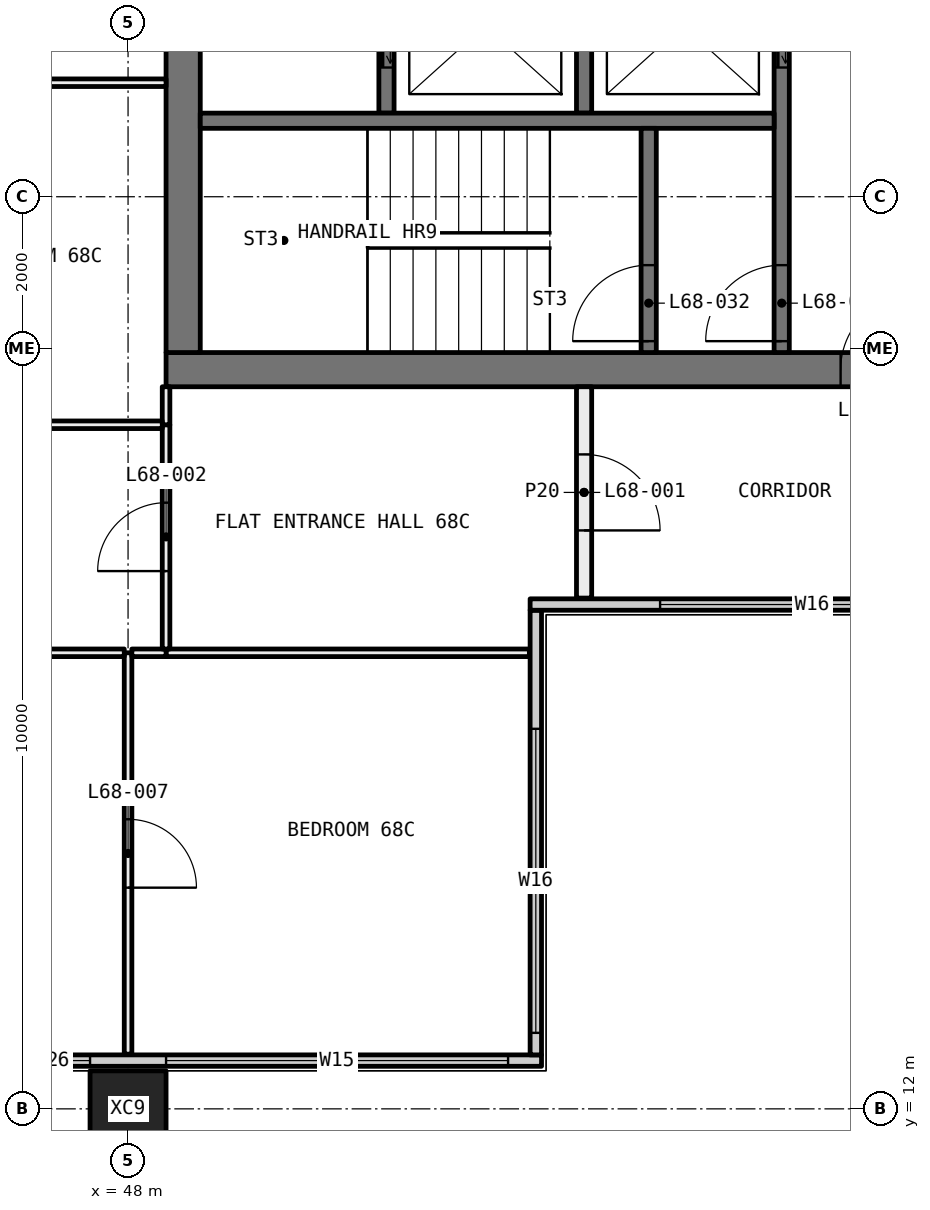
"""IFC4 building model, lengths in metres.
Left out: names, types, materials, properties, quantities, classifications, styles, units other than length and angle.
Written with IfcOpenShell. Run it as: python <this file> out.ifc"""

import sys

from ifc_helpers import new_model, si_unit, direction, frame, frame_2d, origin, origin_2d, place, context, subcontext, project, spatial, rectangle, hollow_rectangle, extrude, element, fill, save


model = new_model("IFC4")
c1 = context("Model", 3, precision=1e-05, world=origin(), true_north=direction((0.0, 1.0)))
c2 = subcontext(c1, "Body", "Model", "MODEL_VIEW")
j1 = project(units=[si_unit("LENGTHUNIT", "METRE"), si_unit("PLANEANGLEUNIT", "RADIAN")], contexts=[c1])
p1 = place(None, origin())
s1 = spatial("IfcSite", under=j1, at=p1, CompositionType="ELEMENT")
p2 = place(p1, origin())
s2 = spatial("IfcBuilding", under=s1, at=p2, CompositionType="ELEMENT")
p3 = place(p2, frame((0.0, 0.0, 252.45)))
s3 = spatial("IfcBuildingStorey", under=s2, at=p3, CompositionType="ELEMENT", Elevation=252.45)
p4 = place(p3, frame((48.0, 12.0, -0.4), z_axis=(0.0, 0.0, 1.0), x_axis=(1.0, 0.0, 0.0)))
e1 = element("IfcColumn", 1, at=p4, inside=s3, PredefinedType="COLUMN", context=c2, shape_type="SweptSolid", body=[
    extrude(hollow_rectangle(XDim=1.0, YDim=1.0, WallThickness=0.036, at=origin_2d()), origin(), (0.0, 0.0, 1.0), 3.45),
])
p5 = place(p3, frame((36.0, 12.635, 0.0), z_axis=(0.0, 0.0, 1.0), x_axis=(1.0, 0.0, 0.0)))
e2 = element("IfcWall", 2, at=p5, inside=s3, PredefinedType="ELEMENTEDWALL", context=c2, shape_type="SweptSolid", body=[
    extrude(rectangle(XDim=17.44, YDim=0.15, at=frame_2d((8.72, 0.0))), origin(), (0.0, 0.0, 1.0), 3.05),
])
p6 = place(p5, frame((0.5, 0.0, 0.45)))
e3 = element("IfcOpeningElement", 3, at=p6, cuts=e2, PredefinedType="OPENING", context=c2, shape_type="SweptSolid", body=[
    extrude(rectangle(XDim=1.0, YDim=2.55, at=frame_2d((0.5, 1.275))), frame((0.0, 0.085, 0.0), z_axis=(0.0, -1.0, 0.0), x_axis=(1.0, 0.0, 0.0)), (0.0, 0.0, 1.0), 0.17),
])
p7 = place(p5, frame((4.0, 0.0, 0.45)))
e4 = element("IfcOpeningElement", 4, at=p7, cuts=e2, PredefinedType="OPENING", context=c2, shape_type="SweptSolid", body=[
    extrude(rectangle(XDim=1.5, YDim=2.55, at=frame_2d((0.75, 1.275))), frame((0.0, 0.085, 0.0), z_axis=(0.0, -1.0, 0.0), x_axis=(1.0, 0.0, 0.0)), (0.0, 0.0, 1.0), 0.17),
])
p8 = place(p5, frame((6.5, 0.0, 0.45)))
e5 = element("IfcOpeningElement", 5, at=p8, cuts=e2, PredefinedType="OPENING", context=c2, shape_type="SweptSolid", body=[
    extrude(rectangle(XDim=1.5, YDim=2.55, at=frame_2d((0.75, 1.275))), frame((0.0, 0.085, 0.0), z_axis=(0.0, -1.0, 0.0), x_axis=(1.0, 0.0, 0.0)), (0.0, 0.0, 1.0), 0.17),
])
p9 = place(p5, frame((10.5, 0.0, 0.45)))
e6 = element("IfcOpeningElement", 6, at=p9, cuts=e2, PredefinedType="OPENING", context=c2, shape_type="SweptSolid", body=[
    extrude(rectangle(XDim=1.0, YDim=2.55, at=frame_2d((0.5, 1.275))), frame((0.0, 0.085, 0.0), z_axis=(0.0, -1.0, 0.0), x_axis=(1.0, 0.0, 0.0)), (0.0, 0.0, 1.0), 0.17),
])
p10 = place(p5, frame((12.5, 0.0, 0.45)))
e7 = element("IfcOpeningElement", 7, at=p10, cuts=e2, PredefinedType="OPENING", context=c2, shape_type="SweptSolid", body=[
    extrude(rectangle(XDim=4.5, YDim=2.55, at=frame_2d((2.25, 1.275))), frame((0.0, 0.085, 0.0), z_axis=(0.0, -1.0, 0.0), x_axis=(1.0, 0.0, 0.0)), (0.0, 0.0, 1.0), 0.17),
])
p11 = place(p3, frame((53.365, 12.71, 0.0), z_axis=(0.0, 0.0, 1.0), x_axis=(0.0, 1.0, 0.0)))
e8 = element("IfcWall", 8, at=p11, inside=s3, PredefinedType="ELEMENTEDWALL", context=c2, shape_type="SweptSolid", body=[
    extrude(rectangle(XDim=5.85, YDim=0.15, at=frame_2d((2.925, 0.0))), origin(), (0.0, 0.0, 1.0), 3.05),
])
p12 = place(p11, frame((0.29, 0.0, 0.45)))
e9 = element("IfcOpeningElement", 9, at=p12, cuts=e8, PredefinedType="OPENING", context=c2, shape_type="SweptSolid", body=[
    extrude(rectangle(XDim=4.0, YDim=2.55, at=frame_2d((2.0, 1.275))), frame((0.0, 0.085, 0.0), z_axis=(0.0, -1.0, 0.0), x_axis=(1.0, 0.0, 0.0)), (0.0, 0.0, 1.0), 0.17),
])
p13 = place(p3, frame((53.29, 18.635, 0.0), z_axis=(0.0, 0.0, 1.0), x_axis=(1.0, 0.0, 0.0)))
e10 = element("IfcWall", 10, at=p13, inside=s3, PredefinedType="ELEMENTEDWALL", context=c2, shape_type="SweptSolid", body=[
    extrude(rectangle(XDim=6.15, YDim=0.15, at=frame_2d((3.075, 0.0))), origin(), (0.0, 0.0, 1.0), 3.05),
])
p14 = place(p13, frame((1.71, 0.0, 0.45)))
e11 = element("IfcOpeningElement", 11, at=p14, cuts=e10, PredefinedType="OPENING", context=c2, shape_type="SweptSolid", body=[
    extrude(rectangle(XDim=4.0, YDim=2.55, at=frame_2d((2.0, 1.275))), frame((0.0, 0.085, 0.0), z_axis=(0.0, -1.0, 0.0), x_axis=(1.0, 0.0, 0.0)), (0.0, 0.0, 1.0), 0.17),
])
p15 = place(p3, frame((48.0, 12.72, 0.0), z_axis=(0.0, 0.0, 1.0), x_axis=(0.0, 1.0, 0.0)))
e12 = element("IfcWall", 12, at=p15, inside=s3, PredefinedType="PARTITIONING", context=c2, shape_type="SweptSolid", body=[
    extrude(rectangle(XDim=5.28, YDim=0.1, at=frame_2d((2.64, 0.0))), origin(), (0.0, 0.0, 1.0), 3.05),
])
p16 = place(p15, frame((2.19, 0.0, 0.0)))
e13 = element("IfcOpeningElement", 13, at=p16, cuts=e12, PredefinedType="OPENING", context=c2, shape_type="SweptSolid", body=[
    extrude(rectangle(XDim=0.9, YDim=2.1, at=frame_2d((0.45, 1.05))), frame((0.0, 0.06, 0.0), z_axis=(0.0, -1.0, 0.0), x_axis=(1.0, 0.0, 0.0)), (0.0, 0.0, 1.0), 0.12),
])
p17 = place(p3, frame((47.95, 18.0, 0.0), z_axis=(0.0, 0.0, 1.0), x_axis=(-1.0, 0.0, 0.0)))
e14 = element("IfcWall", 14, at=p17, inside=s3, PredefinedType="PARTITIONING", context=c2, shape_type="SweptSolid", body=[
    extrude(rectangle(XDim=5.875, YDim=0.1, at=frame_2d((2.938, 0.0))), origin(), (0.0, 0.0, 1.0), 3.05),
])
p18 = place(p17, frame((2.488, 0.0, 0.0)))
e15 = element("IfcOpeningElement", 15, at=p18, cuts=e14, PredefinedType="OPENING", context=c2, shape_type="SweptSolid", body=[
    extrude(rectangle(XDim=0.9, YDim=2.1, at=frame_2d((0.45, 1.05))), frame((0.0, 0.06, 0.0), z_axis=(0.0, -1.0, 0.0), x_axis=(1.0, 0.0, 0.0)), (0.0, 0.0, 1.0), 0.12),
])
p19 = place(p3, frame((53.28, 18.0, 0.0), z_axis=(0.0, 0.0, 1.0), x_axis=(-1.0, 0.0, 0.0)))
e16 = element("IfcWall", 16, at=p19, inside=s3, PredefinedType="PARTITIONING", context=c2, shape_type="SweptSolid", body=[
    extrude(rectangle(XDim=4.78, YDim=0.1, at=frame_2d((2.39, 0.0))), origin(), (0.0, 0.0, 1.0), 3.05),
])
p20 = place(p3, frame((48.5, 18.0, 0.0), z_axis=(0.0, 0.0, 1.0), x_axis=(-1.0, 0.0, 0.0)))
e17 = element("IfcWall", 17, at=p20, inside=s3, PredefinedType="PARTITIONING", context=c2, shape_type="SweptSolid", body=[
    extrude(rectangle(XDim=0.45, YDim=0.1, at=frame_2d((0.225, 0.0))), origin(), (0.0, 0.0, 1.0), 3.05),
])
p21 = place(p3, frame((48.5, 21.0, 0.0), z_axis=(0.0, 0.0, 1.0), x_axis=(0.0, -1.0, 0.0)))
e18 = element("IfcWall", 18, at=p21, inside=s3, PredefinedType="PARTITIONING", context=c2, shape_type="SweptSolid", body=[
    extrude(rectangle(XDim=2.95, YDim=0.1, at=frame_2d((1.475, 0.0))), origin(), (0.0, 0.0, 1.0), 3.05),
])
p22 = place(p21, frame((1.025, 0.0, 0.0)))
e19 = element("IfcOpeningElement", 19, at=p22, cuts=e18, PredefinedType="OPENING", context=c2, shape_type="SweptSolid", body=[
    extrude(rectangle(XDim=0.9, YDim=2.1, at=frame_2d((0.45, 1.05))), frame((0.0, 0.06, 0.0), z_axis=(0.0, -1.0, 0.0), x_axis=(1.0, 0.0, 0.0)), (0.0, 0.0, 1.0), 0.12),
])
p23 = place(p3, frame((48.5, 21.5, 0.0), z_axis=(0.0, 0.0, 1.0), x_axis=(0.0, -1.0, 0.0)))
e20 = element("IfcWall", 20, at=p23, inside=s3, PredefinedType="PARTITIONING", context=c2, shape_type="SweptSolid", body=[
    extrude(rectangle(XDim=0.5, YDim=0.1, at=frame_2d((0.25, 0.0))), origin(), (0.0, 0.0, 1.0), 3.05),
])
p24 = place(p3, frame((54.0, 18.72, 0.0), z_axis=(0.0, 0.0, 1.0), x_axis=(0.0, 1.0, 0.0)))
e21 = element("IfcWall", 21, at=p24, inside=s3, PredefinedType="PARTITIONING", context=c2, shape_type="SweptSolid", body=[
    extrude(rectangle(XDim=2.78, YDim=0.2, at=frame_2d((1.39, 0.0))), origin(), (0.0, 0.0, 1.0), 3.05),
])
p25 = place(p24, frame((0.89, 0.0, 0.0)))
e22 = element("IfcOpeningElement", 22, at=p25, cuts=e21, PredefinedType="OPENING", context=c2, shape_type="SweptSolid", body=[
    extrude(rectangle(XDim=1.0, YDim=2.1, at=frame_2d((0.5, 1.05))), frame((0.0, 0.11, 0.0), z_axis=(0.0, -1.0, 0.0), x_axis=(1.0, 0.0, 0.0)), (0.0, 0.0, 1.0), 0.22),
])
p26 = place(p3, frame((48.45, 21.0, 0.0), z_axis=(0.0, 0.0, 1.0), x_axis=(-1.0, 0.0, 0.0)))
e23 = element("IfcWall", 23, at=p26, inside=s3, PredefinedType="PARTITIONING", context=c2, shape_type="SweptSolid", body=[
    extrude(rectangle(XDim=6.4, YDim=0.1, at=frame_2d((3.2, 0.0))), origin(), (0.0, 0.0, 1.0), 3.05),
])
p27 = place(p26, frame((2.75, 0.0, 0.0)))
e24 = element("IfcOpeningElement", 24, at=p27, cuts=e23, PredefinedType="OPENING", context=c2, shape_type="SweptSolid", body=[
    extrude(rectangle(XDim=0.9, YDim=2.1, at=frame_2d((0.45, 1.05))), frame((0.0, 0.06, 0.0), z_axis=(0.0, -1.0, 0.0), x_axis=(1.0, 0.0, 0.0)), (0.0, 0.0, 1.0), 0.12),
])
p28 = place(p3, frame((48.5, 25.5, 0.0), z_axis=(0.0, 0.0, 1.0), x_axis=(-1.0, 0.0, 0.0)))
e25 = element("IfcWall", 25, at=p28, inside=s3, PredefinedType="PARTITIONING", context=c2, shape_type="SweptSolid", body=[
    extrude(rectangle(XDim=6.45, YDim=0.1, at=frame_2d((3.225, 0.0))), origin(), (0.0, 0.0, 1.0), 3.05),
])
p29 = place(p28, frame((2.775, 0.0, 0.0)))
e26 = element("IfcOpeningElement", 26, at=p29, cuts=e25, PredefinedType="OPENING", context=c2, shape_type="SweptSolid", body=[
    extrude(rectangle(XDim=0.9, YDim=2.1, at=frame_2d((0.45, 1.05))), frame((0.0, 0.06, 0.0), z_axis=(0.0, -1.0, 0.0), x_axis=(1.0, 0.0, 0.0)), (0.0, 0.0, 1.0), 0.12),
])
p30 = place(p3, frame((59.5, 21.725, 0.0), z_axis=(0.0, 0.0, 1.0), x_axis=(-1.0, 0.0, 0.0)))
e27 = element("IfcWall", 27, at=p30, inside=s3, PredefinedType="SHEAR", context=c2, shape_type="SweptSolid", body=[
    extrude(rectangle(XDim=11.0, YDim=0.45, at=frame_2d((5.5, 0.0))), origin(), (0.0, 0.0, 1.0), 3.05),
])
p31 = place(p30, frame((1.125, 0.0, 0.0)))
e28 = element("IfcOpeningElement", 28, at=p31, cuts=e27, PredefinedType="OPENING", context=c2, shape_type="SweptSolid", body=[
    extrude(rectangle(XDim=1.0, YDim=2.1, at=frame_2d((0.5, 1.05))), frame((0.0, 0.235, 0.0), z_axis=(0.0, -1.0, 0.0), x_axis=(1.0, 0.0, 0.0)), (0.0, 0.0, 1.0), 0.47),
])
p32 = place(p3, frame((48.725, 21.95, 0.0), z_axis=(0.0, 0.0, 1.0), x_axis=(0.0, 1.0, 0.0)))
e29 = element("IfcWall", 29, at=p32, inside=s3, PredefinedType="SHEAR", context=c2, shape_type="SweptSolid", body=[
    extrude(rectangle(XDim=16.1, YDim=0.45, at=frame_2d((8.05, 0.0))), origin(), (0.0, 0.0, 1.0), 3.05),
])
p33 = place(p32, frame((7.25, 0.0, 0.0)))
e30 = element("IfcOpeningElement", 30, at=p33, cuts=e29, PredefinedType="OPENING", context=c2, shape_type="SweptSolid", body=[
    extrude(rectangle(XDim=1.6, YDim=2.1, at=frame_2d((0.8, 1.05))), frame((0.0, 0.235, 0.0), z_axis=(0.0, -1.0, 0.0), x_axis=(1.0, 0.0, 0.0)), (0.0, 0.0, 1.0), 0.47),
])
p34 = place(p3, frame((56.6, 21.95, 0.0), z_axis=(0.0, 0.0, 1.0), x_axis=(0.0, 1.0, 0.0)))
e31 = element("IfcWall", 31, at=p34, inside=s3, PredefinedType="SOLIDWALL", context=c2, shape_type="SweptSolid", body=[
    extrude(rectangle(XDim=12.95, YDim=0.2, at=frame_2d((6.475, 0.0))), origin(), (0.0, 0.0, 1.0), 3.05),
])
p35 = place(p34, frame((3.75, 0.0, 0.0)))
e32 = element("IfcOpeningElement", 32, at=p35, cuts=e31, PredefinedType="OPENING", context=c2, shape_type="SweptSolid", body=[
    extrude(rectangle(XDim=1.1, YDim=2.1, at=frame_2d((0.55, 1.05))), frame((0.0, 0.11, 0.0), z_axis=(0.0, -1.0, 0.0), x_axis=(1.0, 0.0, 0.0)), (0.0, 0.0, 1.0), 0.22),
])
p36 = place(p34, frame((0.15, 0.0, 0.0)))
e33 = element("IfcOpeningElement", 33, at=p36, cuts=e31, PredefinedType="OPENING", context=c2, shape_type="SweptSolid", body=[
    extrude(rectangle(XDim=1.0, YDim=2.1, at=frame_2d((0.5, 1.05))), frame((0.0, 0.11, 0.0), z_axis=(0.0, -1.0, 0.0), x_axis=(1.0, 0.0, 0.0)), (0.0, 0.0, 1.0), 0.22),
])
p37 = place(p34, frame((7.025, 0.0, 0.0)))
e34 = element("IfcOpeningElement", 34, at=p37, cuts=e31, PredefinedType="OPENING", context=c2, shape_type="SweptSolid", body=[
    extrude(rectangle(XDim=0.9, YDim=2.1, at=frame_2d((0.45, 1.05))), frame((0.0, 0.11, 0.0), z_axis=(0.0, -1.0, 0.0), x_axis=(1.0, 0.0, 0.0)), (0.0, 0.0, 1.0), 0.22),
])
p38 = place(p34, frame((10.675, 0.0, 0.0)))
e35 = element("IfcOpeningElement", 35, at=p38, cuts=e31, PredefinedType="OPENING", context=c2, shape_type="SweptSolid", body=[
    extrude(rectangle(XDim=0.9, YDim=2.1, at=frame_2d((0.45, 1.05))), frame((0.0, 0.11, 0.0), z_axis=(0.0, -1.0, 0.0), x_axis=(1.0, 0.0, 0.0)), (0.0, 0.0, 1.0), 0.22),
])
p39 = place(p3, frame((51.4, 25.1, 0.0), z_axis=(0.0, 0.0, 1.0), x_axis=(0.0, 1.0, 0.0)))
e36 = element("IfcWall", 36, at=p39, inside=s3, PredefinedType="SOLIDWALL", context=c2, shape_type="SweptSolid", body=[
    extrude(rectangle(XDim=12.95, YDim=0.2, at=frame_2d((6.475, 0.0))), origin(), (0.0, 0.0, 1.0), 3.05),
])
p40 = place(p39, frame((0.6, 0.0, 0.0)))
e37 = element("IfcOpeningElement", 37, at=p40, cuts=e36, PredefinedType="OPENING", context=c2, shape_type="SweptSolid", body=[
    extrude(rectangle(XDim=1.1, YDim=2.1, at=frame_2d((0.55, 1.05))), frame((0.0, 0.11, 0.0), z_axis=(0.0, -1.0, 0.0), x_axis=(1.0, 0.0, 0.0)), (0.0, 0.0, 1.0), 0.22),
])
p41 = place(p39, frame((3.1, 0.0, 0.0)))
e38 = element("IfcOpeningElement", 38, at=p41, cuts=e36, PredefinedType="OPENING", context=c2, shape_type="SweptSolid", body=[
    extrude(rectangle(XDim=1.1, YDim=2.1, at=frame_2d((0.55, 1.05))), frame((0.0, 0.11, 0.0), z_axis=(0.0, -1.0, 0.0), x_axis=(1.0, 0.0, 0.0)), (0.0, 0.0, 1.0), 0.22),
])
p42 = place(p39, frame((5.6, 0.0, 0.0)))
e39 = element("IfcOpeningElement", 39, at=p42, cuts=e36, PredefinedType="OPENING", context=c2, shape_type="SweptSolid", body=[
    extrude(rectangle(XDim=1.1, YDim=2.1, at=frame_2d((0.55, 1.05))), frame((0.0, 0.11, 0.0), z_axis=(0.0, -1.0, 0.0), x_axis=(1.0, 0.0, 0.0)), (0.0, 0.0, 1.0), 0.22),
])
p43 = place(p39, frame((8.1, 0.0, 0.0)))
e40 = element("IfcOpeningElement", 40, at=p43, cuts=e36, PredefinedType="OPENING", context=c2, shape_type="SweptSolid", body=[
    extrude(rectangle(XDim=1.1, YDim=2.1, at=frame_2d((0.55, 1.05))), frame((0.0, 0.11, 0.0), z_axis=(0.0, -1.0, 0.0), x_axis=(1.0, 0.0, 0.0)), (0.0, 0.0, 1.0), 0.22),
])
p44 = place(p39, frame((10.975, 0.0, 0.0)))
e41 = element("IfcOpeningElement", 41, at=p44, cuts=e36, PredefinedType="OPENING", context=c2, shape_type="SweptSolid", body=[
    extrude(rectangle(XDim=1.0, YDim=2.1, at=frame_2d((0.5, 1.05))), frame((0.0, 0.11, 0.0), z_axis=(0.0, -1.0, 0.0), x_axis=(1.0, 0.0, 0.0)), (0.0, 0.0, 1.0), 0.22),
])
p45 = place(p3, frame((54.0, 25.1, 0.0), z_axis=(0.0, 0.0, 1.0), x_axis=(0.0, 1.0, 0.0)))
e42 = element("IfcWall", 42, at=p45, inside=s3, PredefinedType="SOLIDWALL", context=c2, shape_type="SweptSolid", body=[
    extrude(rectangle(XDim=9.8, YDim=0.2, at=frame_2d((4.9, 0.0))), origin(), (0.0, 0.0, 1.0), 3.05),
])
p46 = place(p3, frame((56.5, 25.0, 0.0), z_axis=(0.0, 0.0, 1.0), x_axis=(-1.0, 0.0, 0.0)))
e43 = element("IfcWall", 43, at=p46, inside=s3, PredefinedType="SOLIDWALL", context=c2, shape_type="SweptSolid", body=[
    extrude(rectangle(XDim=7.55, YDim=0.2, at=frame_2d((3.775, 0.0))), origin(), (0.0, 0.0, 1.0), 3.05),
])
p47 = place(p3, frame((54.85, 21.95, 0.0), z_axis=(0.0, 0.0, 1.0), x_axis=(0.0, 1.0, 0.0)))
e44 = element("IfcWall", 44, at=p47, inside=s3, PredefinedType="SOLIDWALL", context=c2, shape_type="SweptSolid", body=[
    extrude(rectangle(XDim=2.95, YDim=0.2, at=frame_2d((1.475, 0.0))), origin(), (0.0, 0.0, 1.0), 3.05),
])
p48 = place(p47, frame((0.15, 0.0, 0.0)))
e45 = element("IfcOpeningElement", 45, at=p48, cuts=e44, PredefinedType="OPENING", context=c2, shape_type="SweptSolid", body=[
    extrude(rectangle(XDim=1.0, YDim=2.1, at=frame_2d((0.5, 1.05))), frame((0.0, 0.11, 0.0), z_axis=(0.0, -1.0, 0.0), x_axis=(1.0, 0.0, 0.0)), (0.0, 0.0, 1.0), 0.22),
])
p49 = place(p9, origin())
e46 = element("IfcWindow", 46, at=p49, inside=s3, PartitioningType="SINGLE_PANEL", PredefinedType="WINDOW", context=c2, shape_type="SweptSolid", body=[
    extrude(rectangle(XDim=1.0, YDim=2.55, at=frame_2d((0.5, 1.275))), frame((0.0, 0.03, 0.0), z_axis=(0.0, -1.0, 0.0), x_axis=(1.0, 0.0, 0.0)), (0.0, 0.0, 1.0), 0.06),
])
fill(e6, e46)
p50 = place(p10, origin())
e47 = element("IfcWindow", 47, at=p50, inside=s3, PartitioningType="SINGLE_PANEL", PredefinedType="WINDOW", context=c2, shape_type="SweptSolid", body=[
    extrude(rectangle(XDim=4.5, YDim=2.55, at=frame_2d((2.25, 1.275))), frame((0.0, 0.03, 0.0), z_axis=(0.0, -1.0, 0.0), x_axis=(1.0, 0.0, 0.0)), (0.0, 0.0, 1.0), 0.06),
])
fill(e7, e47)
p51 = place(p12, origin())
e48 = element("IfcWindow", 48, at=p51, inside=s3, PartitioningType="SINGLE_PANEL", PredefinedType="WINDOW", context=c2, shape_type="SweptSolid", body=[
    extrude(rectangle(XDim=4.0, YDim=2.55, at=frame_2d((2.0, 1.275))), frame((0.0, 0.03, 0.0), z_axis=(0.0, -1.0, 0.0), x_axis=(1.0, 0.0, 0.0)), (0.0, 0.0, 1.0), 0.06),
])
fill(e9, e48)
p52 = place(p14, origin())
e49 = element("IfcWindow", 49, at=p52, inside=s3, PartitioningType="SINGLE_PANEL", PredefinedType="WINDOW", context=c2, shape_type="SweptSolid", body=[
    extrude(rectangle(XDim=4.0, YDim=2.55, at=frame_2d((2.0, 1.275))), frame((0.0, 0.03, 0.0), z_axis=(0.0, -1.0, 0.0), x_axis=(1.0, 0.0, 0.0)), (0.0, 0.0, 1.0), 0.06),
])
fill(e11, e49)
p53 = place(p25, frame((1.0, 0.0, 0.0), x_axis=(-1.0, 0.0, 0.0)))
e50 = element("IfcDoor", 50, at=p53, inside=s3, OperationType="SINGLE_SWING_LEFT", PredefinedType="DOOR", context=c2, shape_type="SweptSolid", body=[
    extrude(rectangle(XDim=1.0, YDim=2.1, at=frame_2d((0.5, 1.05))), frame((0.0, 0.025, 0.0), z_axis=(0.0, -1.0, 0.0), x_axis=(1.0, 0.0, 0.0)), (0.0, 0.0, 1.0), 0.05),
])
fill(e22, e50)
p54 = place(p22, frame((0.9, 0.0, 0.0), x_axis=(-1.0, 0.0, 0.0)))
e51 = element("IfcDoor", 51, at=p54, inside=s3, OperationType="SINGLE_SWING_RIGHT", PredefinedType="DOOR", context=c2, shape_type="SweptSolid", body=[
    extrude(rectangle(XDim=0.9, YDim=2.1, at=frame_2d((0.45, 1.05))), frame((0.0, 0.025, 0.0), z_axis=(0.0, -1.0, 0.0), x_axis=(1.0, 0.0, 0.0)), (0.0, 0.0, 1.0), 0.05),
])
fill(e19, e51)
p55 = place(p16, frame((0.9, 0.0, 0.0), x_axis=(-1.0, 0.0, 0.0)))
e52 = element("IfcDoor", 52, at=p55, inside=s3, OperationType="SINGLE_SWING_LEFT", PredefinedType="DOOR", context=c2, shape_type="SweptSolid", body=[
    extrude(rectangle(XDim=0.9, YDim=2.1, at=frame_2d((0.45, 1.05))), frame((0.0, 0.025, 0.0), z_axis=(0.0, -1.0, 0.0), x_axis=(1.0, 0.0, 0.0)), (0.0, 0.0, 1.0), 0.05),
])
fill(e13, e52)
p56 = place(p40, origin())
e53 = element("IfcDoor", 53, at=p56, inside=s3, OperationType="SLIDING_TO_LEFT", PredefinedType="DOOR", context=c2, shape_type="SweptSolid", body=[
    extrude(rectangle(XDim=1.1, YDim=2.1, at=frame_2d((0.55, 1.05))), frame((0.0, 0.025, 0.0), z_axis=(0.0, -1.0, 0.0), x_axis=(1.0, 0.0, 0.0)), (0.0, 0.0, 1.0), 0.05),
])
fill(e37, e53)
p57 = place(p35, origin())
e54 = element("IfcDoor", 54, at=p57, inside=s3, OperationType="SLIDING_TO_LEFT", PredefinedType="DOOR", context=c2, shape_type="SweptSolid", body=[
    extrude(rectangle(XDim=1.1, YDim=2.1, at=frame_2d((0.55, 1.05))), frame((0.0, 0.025, 0.0), z_axis=(0.0, -1.0, 0.0), x_axis=(1.0, 0.0, 0.0)), (0.0, 0.0, 1.0), 0.05),
])
fill(e32, e54)
p58 = place(p48, origin())
e55 = element("IfcDoor", 55, at=p58, inside=s3, OperationType="SINGLE_SWING_RIGHT", PredefinedType="DOOR", context=c2, shape_type="SweptSolid", body=[
    extrude(rectangle(XDim=1.0, YDim=2.1, at=frame_2d((0.5, 1.05))), frame((0.0, 0.025, 0.0), z_axis=(0.0, -1.0, 0.0), x_axis=(1.0, 0.0, 0.0)), (0.0, 0.0, 1.0), 0.05),
])
fill(e45, e55)
p59 = place(p36, origin())
e56 = element("IfcDoor", 56, at=p59, inside=s3, OperationType="SINGLE_SWING_RIGHT", PredefinedType="DOOR", context=c2, shape_type="SweptSolid", body=[
    extrude(rectangle(XDim=1.0, YDim=2.1, at=frame_2d((0.5, 1.05))), frame((0.0, 0.025, 0.0), z_axis=(0.0, -1.0, 0.0), x_axis=(1.0, 0.0, 0.0)), (0.0, 0.0, 1.0), 0.05),
])
fill(e33, e56)
p60 = place(p31, frame((1.0, 0.0, 0.0), x_axis=(-1.0, 0.0, 0.0)))
e57 = element("IfcDoor", 57, at=p60, inside=s3, OperationType="SINGLE_SWING_LEFT", PredefinedType="DOOR", context=c2, shape_type="SweptSolid", body=[
    extrude(rectangle(XDim=1.0, YDim=2.1, at=frame_2d((0.5, 1.05))), frame((0.0, 0.025, 0.0), z_axis=(0.0, -1.0, 0.0), x_axis=(1.0, 0.0, 0.0)), (0.0, 0.0, 1.0), 0.05),
])
fill(e28, e57)
save(model, sys.argv[1])
